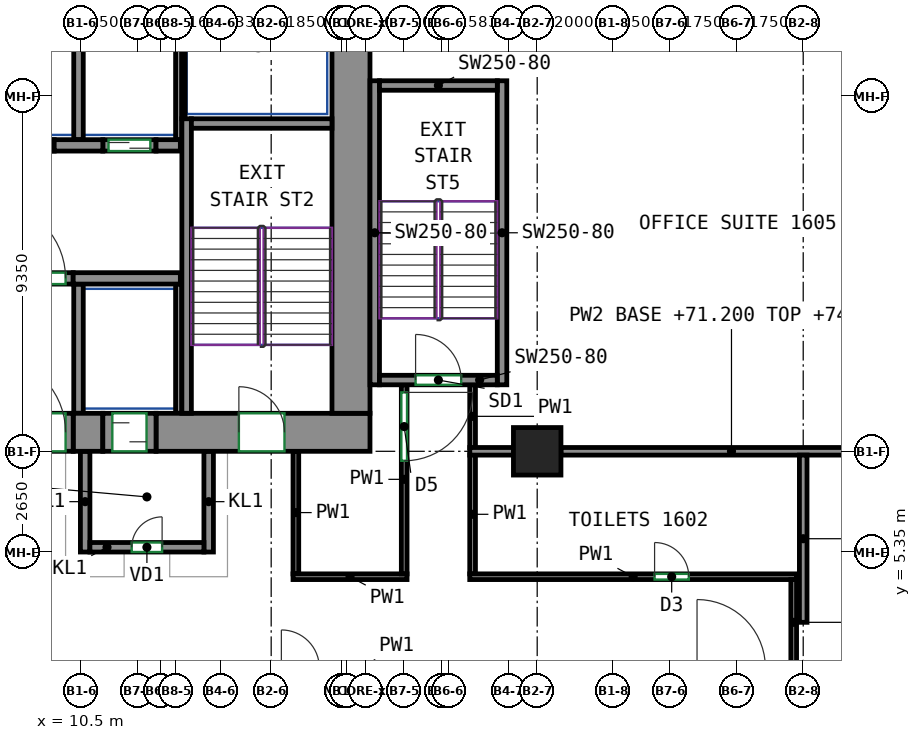
"""IFC4 building model, lengths in metres.
Left out: names, types, materials, properties, quantities, classifications, styles, units other than length and angle.
Written with IfcOpenShell. Run it as: python <this file> out.ifc"""

import sys

from ifc_helpers import new_model, si_unit, direction, frame, frame_2d, origin, origin_2d, place, context, subcontext, project, spatial, rectangle, extrude, source, transform, mapped, element, fill, save


model = new_model("IFC4")
c1 = context("Model", 3, precision=1e-05, world=origin(), true_north=direction((0.0, 1.0)))
c2 = subcontext(c1, "Body", "Model", "MODEL_VIEW")
j1 = project(units=[si_unit("LENGTHUNIT", "METRE"), si_unit("PLANEANGLEUNIT", "RADIAN")], contexts=[c1])
p1 = place(None, origin())
s1 = spatial("IfcSite", under=j1, at=p1, CompositionType="ELEMENT")
p2 = place(p1, origin())
s2 = spatial("IfcBuilding", under=s1, at=p2, CompositionType="ELEMENT")
p3 = place(p2, frame((0.0, 0.0, 71.2)))
s3 = spatial("IfcBuildingStorey", under=s2, at=p3, CompositionType="ELEMENT", Elevation=71.2)
m1 = source(origin(), c2, "Body", "SweptSolid", [
    extrude(rectangle(XDim=1.25, YDim=1.25, at=origin_2d()), origin(), (0.0, 0.0, 1.0), 3.72),
])
p4 = place(p3, frame((22.5, 8.0, 0.0), z_axis=(0.0, 0.0, 1.0), x_axis=(1.0, 0.0, 0.0)))
e1 = element("IfcColumn", 1, at=p4, inside=s3, PredefinedType="COLUMN", context=c2, shape_type="MappedRepresentation", body=[
    mapped(m1, transform((0.0, 0.0, 0.0))),
])
m2 = source(origin(), c2, "Body", "SweptSolid", [
    extrude(rectangle(XDim=0.78, YDim=1.0, at=frame_2d((0.39, 0.0))), origin(), (0.0, 0.0, 1.0), 3.72),
])
p5 = place(p3, frame((10.29, 8.5, 0.0), z_axis=(0.0, 0.0, 1.0), x_axis=(1.0, 0.0, 0.0)))
e2 = element("IfcWall", 2, at=p5, inside=s3, PredefinedType="SHEAR", context=c2, shape_type="MappedRepresentation", body=[
    mapped(m2, transform((0.0, 0.0, 0.0))),
])
m3 = source(origin(), c2, "Body", "SweptSolid", [
    extrude(rectangle(XDim=5.63, YDim=1.0, at=frame_2d((2.815, 0.0))), origin(), (0.0, 0.0, 1.0), 3.72),
])
p6 = place(p3, frame((12.47, 8.5, 0.0), z_axis=(0.0, 0.0, 1.0), x_axis=(1.0, 0.0, 0.0)))
e3 = element("IfcWall", 3, at=p6, inside=s3, PredefinedType="SHEAR", context=c2, shape_type="MappedRepresentation", body=[
    mapped(m3, transform((0.0, 0.0, 0.0))),
])
p7 = place(p6, frame((2.18, 0.0, 0.0)))
e4 = element("IfcOpeningElement", 4, at=p7, cuts=e3, PredefinedType="OPENING", context=c2, shape_type="SweptSolid", body=[
    extrude(rectangle(XDim=1.2, YDim=2.1, at=frame_2d((0.6, 1.05))), frame((0.0, 0.51, 0.0), z_axis=(0.0, -1.0, 0.0), x_axis=(1.0, 0.0, 0.0)), (0.0, 0.0, 1.0), 1.02),
])
m4 = source(origin(), c2, "Body", "SweptSolid", [
    extrude(rectangle(XDim=12.0, YDim=1.0, at=frame_2d((6.0, 0.0))), origin(), (0.0, 0.0, 1.0), 3.72),
])
p8 = place(p3, frame((17.6, 9.0, 0.0), z_axis=(0.0, 0.0, 1.0), x_axis=(0.0, 1.0, 0.0)))
e5 = element("IfcWall", 5, at=p8, inside=s3, PredefinedType="SHEAR", context=c2, shape_type="MappedRepresentation", body=[
    mapped(m4, transform((0.0, 0.0, 0.0))),
])
m5 = source(origin(), c2, "Body", "SweptSolid", [
    extrude(rectangle(XDim=7.75, YDim=0.25, at=frame_2d((3.875, 0.0))), origin(), (0.0, 0.0, 1.0), 3.72),
])
p9 = place(p3, frame((13.275, 9.0, 0.0), z_axis=(0.0, 0.0, 1.0), x_axis=(0.0, 1.0, 0.0)))
e6 = element("IfcWall", 6, at=p9, inside=s3, PredefinedType="SHEAR", context=c2, shape_type="MappedRepresentation", body=[
    mapped(m5, transform((0.0, 0.0, 0.0))),
])
m6 = source(origin(), c2, "Body", "SweptSolid", [
    extrude(rectangle(XDim=3.7, YDim=0.25, at=frame_2d((1.85, 0.0))), origin(), (0.0, 0.0, 1.0), 3.72),
])
p10 = place(p3, frame((13.4, 16.625, 0.0), z_axis=(0.0, 0.0, 1.0), x_axis=(1.0, 0.0, 0.0)))
e7 = element("IfcWall", 7, at=p10, inside=s3, PredefinedType="SHEAR", context=c2, shape_type="MappedRepresentation", body=[
    mapped(m6, transform((0.0, 0.0, 0.0))),
])
m7 = source(origin(), c2, "Body", "SweptSolid", [
    extrude(rectangle(XDim=8.0, YDim=0.25, at=frame_2d((4.0, 0.0))), origin(), (0.0, 0.0, 1.0), 3.72),
])
for number, where, z_axis, x_axis in (
    (8, (18.225, 9.75, 0.0), (0.0, 0.0, 1.0), (0.0, 1.0, 0.0)),
    (9, (21.575, 9.75, 0.0), (0.0, 0.0, 1.0), (0.0, 1.0, 0.0)),
):
    element("IfcWall", number, at=place(p3, frame(where, z_axis=z_axis, x_axis=x_axis)), inside=s3, PredefinedType="SHEAR", context=c2, shape_type="MappedRepresentation", body=[
        mapped(m7, transform((0.0, 0.0, 0.0))),
    ])
m8 = source(origin(), c2, "Body", "SweptSolid", [
    extrude(rectangle(XDim=3.1, YDim=0.25, at=frame_2d((1.55, 0.0))), origin(), (0.0, 0.0, 1.0), 3.72),
])
p11 = place(p3, frame((18.35, 9.875, 0.0), z_axis=(0.0, 0.0, 1.0), x_axis=(1.0, 0.0, 0.0)))
e10 = element("IfcWall", 10, at=p11, inside=s3, PredefinedType="SHEAR", context=c2, shape_type="MappedRepresentation", body=[
    mapped(m8, transform((0.0, 0.0, 0.0))),
])
p12 = place(p11, frame((0.95, 0.0, 0.0)))
e11 = element("IfcOpeningElement", 11, at=p12, cuts=e10, PredefinedType="OPENING", context=c2, shape_type="SweptSolid", body=[
    extrude(rectangle(XDim=1.2, YDim=2.1, at=frame_2d((0.6, 1.05))), frame((0.0, 0.135, 0.0), z_axis=(0.0, -1.0, 0.0), x_axis=(1.0, 0.0, 0.0)), (0.0, 0.0, 1.0), 0.27),
])
p13 = place(p3, frame((18.35, 17.625, 0.0), z_axis=(0.0, 0.0, 1.0), x_axis=(1.0, 0.0, 0.0)))
e12 = element("IfcWall", 12, at=p13, inside=s3, PredefinedType="SHEAR", context=c2, shape_type="MappedRepresentation", body=[
    mapped(m8, transform((0.0, 0.0, 0.0))),
])
m9 = source(origin(), c2, "Body", "SweptSolid", [
    extrude(rectangle(XDim=2.82, YDim=0.3, at=frame_2d((1.41, 0.0))), origin(), (0.0, 0.0, 1.0), 3.72),
])
p14 = place(p3, frame((10.29, 12.55, 0.0), z_axis=(0.0, 0.0, 1.0), x_axis=(1.0, 0.0, 0.0)))
e13 = element("IfcWall", 13, at=p14, inside=s3, PredefinedType="SHEAR", context=c2, shape_type="MappedRepresentation", body=[
    mapped(m9, transform((0.0, 0.0, 0.0))),
])
m10 = source(origin(), c2, "Body", "SweptSolid", [
    extrude(rectangle(XDim=1.28, YDim=0.3, at=frame_2d((0.64, 0.0))), origin(), (0.0, 0.0, 1.0), 3.72),
])
p15 = place(p3, frame((9.79, 16.05, 0.0), z_axis=(0.0, 0.0, 1.0), x_axis=(1.0, 0.0, 0.0)))
e14 = element("IfcWall", 14, at=p15, inside=s3, PredefinedType="SHEAR", context=c2, shape_type="MappedRepresentation", body=[
    mapped(m10, transform((0.0, 0.0, 0.0))),
])
m11 = source(origin(), c2, "Body", "SweptSolid", [
    extrude(rectangle(XDim=0.64, YDim=0.3, at=frame_2d((0.32, 0.0))), origin(), (0.0, 0.0, 1.0), 3.72),
])
p16 = place(p3, frame((12.47, 16.05, 0.0), z_axis=(0.0, 0.0, 1.0), x_axis=(1.0, 0.0, 0.0)))
e15 = element("IfcWall", 15, at=p16, inside=s3, PredefinedType="SHEAR", context=c2, shape_type="MappedRepresentation", body=[
    mapped(m11, transform((0.0, 0.0, 0.0))),
])
m12 = source(origin(), c2, "Body", "SweptSolid", [
    extrude(rectangle(XDim=1.4, YDim=0.3, at=frame_2d((0.7, 0.0))), origin(), (0.0, 0.0, 1.0), 3.72),
])
p17 = place(p3, frame((11.07, 16.05, 0.0), z_axis=(0.0, 0.0, 1.0), x_axis=(1.0, 0.0, 0.0)))
e16 = element("IfcWall", 16, at=p17, inside=s3, PredefinedType="PARTITIONING", context=c2, shape_type="MappedRepresentation", body=[
    mapped(m12, transform((0.0, 0.0, 0.0))),
])
p18 = place(p17, frame((0.15, 0.0, 0.0)))
e17 = element("IfcOpeningElement", 17, at=p18, cuts=e16, PredefinedType="OPENING", context=c2, shape_type="SweptSolid", body=[
    extrude(rectangle(XDim=1.1, YDim=2.1, at=frame_2d((0.55, 1.05))), frame((0.0, 0.16, 0.0), z_axis=(0.0, -1.0, 0.0), x_axis=(1.0, 0.0, 0.0)), (0.0, 0.0, 1.0), 0.32),
])
m13 = source(origin(), c2, "Body", "SweptSolid", [
    extrude(rectangle(XDim=2.4, YDim=0.3, at=frame_2d((1.2, 0.0))), origin(), (0.0, 0.0, 1.0), 3.72),
])
p19 = place(p3, frame((7.89, 12.55, 0.0), z_axis=(0.0, 0.0, 1.0), x_axis=(1.0, 0.0, 0.0)))
e18 = element("IfcWall", 18, at=p19, inside=s3, PredefinedType="PARTITIONING", context=c2, shape_type="MappedRepresentation", body=[
    mapped(m13, transform((0.0, 0.0, 0.0))),
])
p20 = place(p19, frame((0.2, 0.0, 0.0)))
e19 = element("IfcOpeningElement", 19, at=p20, cuts=e18, PredefinedType="OPENING", context=c2, shape_type="SweptSolid", body=[
    extrude(rectangle(XDim=2.0, YDim=2.1, at=frame_2d((1.0, 1.05))), frame((0.0, 0.16, 0.0), z_axis=(0.0, -1.0, 0.0), x_axis=(1.0, 0.0, 0.0)), (0.0, 0.0, 1.0), 0.32),
])
m14 = source(origin(), c2, "Body", "SweptSolid", [
    extrude(rectangle(XDim=1.4, YDim=0.3, at=frame_2d((0.7, 0.0))), origin(), (0.0, 0.0, 1.0), 3.72),
])
p21 = place(p3, frame((8.39, 16.05, 0.0), z_axis=(0.0, 0.0, 1.0), x_axis=(1.0, 0.0, 0.0)))
e20 = element("IfcWall", 20, at=p21, inside=s3, PredefinedType="PARTITIONING", context=c2, shape_type="MappedRepresentation", body=[
    mapped(m14, transform((0.0, 0.0, 0.0))),
])
m15 = source(origin(), c2, "Body", "SweptSolid", [
    extrude(rectangle(XDim=2.65, YDim=0.25, at=frame_2d((1.325, 0.0))), origin(), (0.0, 0.0, 1.0), 3.72),
])
for number, where, z_axis, x_axis in (
    (21, (10.605, 5.35, 0.0), (0.0, 0.0, 1.0), (0.0, 1.0, 0.0)),
    (22, (13.855, 5.35, 0.0), (0.0, 0.0, 1.0), (0.0, 1.0, 0.0)),
):
    element("IfcWall", number, at=place(p3, frame(where, z_axis=z_axis, x_axis=x_axis)), inside=s3, PredefinedType="PARTITIONING", context=c2, shape_type="MappedRepresentation", body=[
        mapped(m15, transform((0.0, 0.0, 0.0))),
    ])
m16 = source(origin(), c2, "Body", "SweptSolid", [
    extrude(rectangle(XDim=3.0, YDim=0.25, at=frame_2d((1.5, 0.0))), origin(), (0.0, 0.0, 1.0), 3.72),
])
p22 = place(p3, frame((10.73, 5.475, 0.0), z_axis=(0.0, 0.0, 1.0), x_axis=(1.0, 0.0, 0.0)))
e23 = element("IfcWall", 23, at=p22, inside=s3, PredefinedType="PARTITIONING", context=c2, shape_type="MappedRepresentation", body=[
    mapped(m16, transform((0.0, 0.0, 0.0))),
])
p23 = place(p22, frame((1.1, 0.0, 0.0)))
e24 = element("IfcOpeningElement", 24, at=p23, cuts=e23, PredefinedType="OPENING", context=c2, shape_type="SweptSolid", body=[
    extrude(rectangle(XDim=0.8, YDim=2.0, at=frame_2d((0.4, 1.0))), frame((0.0, 0.135, 0.0), z_axis=(0.0, -1.0, 0.0), x_axis=(1.0, 0.0, 0.0)), (0.0, 0.0, 1.0), 0.27),
])
m17 = source(origin(), c2, "Body", "SweptSolid", [
    extrude(rectangle(XDim=3.275, YDim=0.165, at=frame_2d((1.638, 0.0))), origin(), (0.0, 0.0, 1.0), 3.72),
])
p24 = place(p3, frame((13.067, 16.2, 0.0), z_axis=(0.0, 0.0, 1.0), x_axis=(0.0, 1.0, 0.0)))
e25 = element("IfcWall", 25, at=p24, inside=s3, PredefinedType="PARTITIONING", context=c2, shape_type="MappedRepresentation", body=[
    mapped(m17, transform((0.0, 0.0, 0.0))),
])
m18 = source(origin(), c2, "Body", "SweptSolid", [
    extrude(rectangle(XDim=3.275, YDim=0.25, at=frame_2d((1.638, 0.0))), origin(), (0.0, 0.0, 1.0), 3.72),
])
p25 = place(p3, frame((10.43, 16.2, 0.0), z_axis=(0.0, 0.0, 1.0), x_axis=(0.0, 1.0, 0.0)))
e26 = element("IfcWall", 26, at=p25, inside=s3, PredefinedType="PARTITIONING", context=c2, shape_type="MappedRepresentation", body=[
    mapped(m18, transform((0.0, 0.0, 0.0))),
])
m19 = source(origin(), c2, "Body", "SweptSolid", [
    extrude(rectangle(XDim=2.725, YDim=0.085, at=frame_2d((1.363, 0.0))), origin(), (0.0, 0.0, 1.0), 3.72),
])
p26 = place(p3, frame((13.192, 16.75, 0.0), z_axis=(0.0, 0.0, 1.0), x_axis=(0.0, 1.0, 0.0)))
e27 = element("IfcWall", 27, at=p26, inside=s3, PredefinedType="PARTITIONING", context=c2, shape_type="MappedRepresentation", body=[
    mapped(m19, transform((0.0, 0.0, 0.0))),
])
m20 = source(origin(), c2, "Body", "SweptSolid", [
    extrude(rectangle(XDim=3.4, YDim=0.25, at=frame_2d((1.7, 0.0))), origin(), (0.0, 0.0, 1.0), 3.72),
])
p27 = place(p3, frame((10.43, 9.0, 0.0), z_axis=(0.0, 0.0, 1.0), x_axis=(0.0, 1.0, 0.0)))
e28 = element("IfcWall", 28, at=p27, inside=s3, PredefinedType="PARTITIONING", context=c2, shape_type="MappedRepresentation", body=[
    mapped(m20, transform((0.0, 0.0, 0.0))),
])
m21 = source(origin(), c2, "Body", "SweptSolid", [
    extrude(rectangle(XDim=3.4, YDim=0.165, at=frame_2d((1.7, 0.0))), origin(), (0.0, 0.0, 1.0), 3.72),
])
p28 = place(p3, frame((13.067, 9.0, 0.0), z_axis=(0.0, 0.0, 1.0), x_axis=(0.0, 1.0, 0.0)))
e29 = element("IfcWall", 29, at=p28, inside=s3, PredefinedType="PARTITIONING", context=c2, shape_type="MappedRepresentation", body=[
    mapped(m21, transform((0.0, 0.0, 0.0))),
])
m22 = source(origin(), c2, "Body", "SweptSolid", [
    extrude(rectangle(XDim=2.4, YDim=1.0, at=frame_2d((1.2, 0.0))), origin(), (0.0, 0.0, 1.0), 2.7),
])
p29 = place(p3, frame((7.89, 8.5, 0.0), z_axis=(0.0, 0.0, 1.0), x_axis=(1.0, 0.0, 0.0)))
e30 = element("IfcWall", 30, at=p29, inside=s3, PredefinedType="PARTITIONING", context=c2, shape_type="MappedRepresentation", body=[
    mapped(m22, transform((0.0, 0.0, 0.0))),
])
p30 = place(p29, frame((0.2, 0.0, 0.0)))
e31 = element("IfcOpeningElement", 31, at=p30, cuts=e30, PredefinedType="OPENING", context=c2, shape_type="SweptSolid", body=[
    extrude(rectangle(XDim=2.0, YDim=2.1, at=frame_2d((1.0, 1.05))), frame((0.0, 0.51, 0.0), z_axis=(0.0, -1.0, 0.0), x_axis=(1.0, 0.0, 0.0)), (0.0, 0.0, 1.0), 1.02),
])
m23 = source(origin(), c2, "Body", "SweptSolid", [
    extrude(rectangle(XDim=1.4, YDim=1.0, at=frame_2d((0.7, 0.0))), origin(), (0.0, 0.0, 1.0), 2.7),
])
p31 = place(p3, frame((11.07, 8.5, 0.0), z_axis=(0.0, 0.0, 1.0), x_axis=(1.0, 0.0, 0.0)))
e32 = element("IfcWall", 32, at=p31, inside=s3, PredefinedType="PARTITIONING", context=c2, shape_type="MappedRepresentation", body=[
    mapped(m23, transform((0.0, 0.0, 0.0))),
])
p32 = place(p31, frame((0.25, 0.0, 0.0)))
e33 = element("IfcOpeningElement", 33, at=p32, cuts=e32, PredefinedType="OPENING", context=c2, shape_type="SweptSolid", body=[
    extrude(rectangle(XDim=0.9, YDim=2.1, at=frame_2d((0.45, 1.05))), frame((0.0, 0.51, 0.0), z_axis=(0.0, -1.0, 0.0), x_axis=(1.0, 0.0, 0.0)), (0.0, 0.0, 1.0), 1.02),
])
p33 = place(p3, frame((16.15, 4.775, 0.0), z_axis=(0.0, 0.0, 1.0), x_axis=(0.0, 1.0, 0.0)))
e34 = element("IfcWall", 34, at=p33, inside=s3, PredefinedType="PARTITIONING", context=c2, shape_type="SweptSolid", body=[
    extrude(rectangle(XDim=3.225, YDim=0.15, at=frame_2d((1.613, 0.0))), origin(), (0.0, 0.0, 1.0), 3.72),
])
p34 = place(p3, frame((16.075, 4.7, 0.0), z_axis=(0.0, 0.0, 1.0), x_axis=(1.0, 0.0, 0.0)))
e35 = element("IfcWall", 35, at=p34, inside=s3, PredefinedType="PARTITIONING", context=c2, shape_type="SweptSolid", body=[
    extrude(rectangle(XDim=3.0, YDim=0.15, at=frame_2d((1.5, 0.0))), origin(), (0.0, 0.0, 1.0), 3.72),
])
p35 = place(p3, frame((19.0, 9.75, 0.0), z_axis=(0.0, 0.0, 1.0), x_axis=(0.0, -1.0, 0.0)))
e36 = element("IfcWall", 36, at=p35, inside=s3, PredefinedType="PARTITIONING", context=c2, shape_type="SweptSolid", body=[
    extrude(rectangle(XDim=4.975, YDim=0.15, at=frame_2d((2.488, 0.0))), origin(), (0.0, 0.0, 1.0), 3.72),
])
p36 = place(p35, frame((0.2, 0.0, 0.0)))
e37 = element("IfcOpeningElement", 37, at=p36, cuts=e36, PredefinedType="OPENING", context=c2, shape_type="SweptSolid", body=[
    extrude(rectangle(XDim=1.8, YDim=2.1, at=frame_2d((0.9, 1.05))), frame((0.0, 0.085, 0.0), z_axis=(0.0, -1.0, 0.0), x_axis=(1.0, 0.0, 0.0)), (0.0, 0.0, 1.0), 0.17),
])
p37 = place(p3, frame((20.8, 8.09, 0.0), z_axis=(0.0, 0.0, 1.0), x_axis=(0.0, 1.0, 0.0)))
e38 = element("IfcWall", 38, at=p37, inside=s3, PredefinedType="PARTITIONING", context=c2, shape_type="SweptSolid", body=[
    extrude(rectangle(XDim=1.66, YDim=0.15, at=frame_2d((0.83, 0.0))), origin(), (0.0, 0.0, 1.0), 3.72),
])
p38 = place(p3, frame((20.8, 4.775, 0.0), z_axis=(0.0, 0.0, 1.0), x_axis=(0.0, 1.0, 0.0)))
e39 = element("IfcWall", 39, at=p38, inside=s3, PredefinedType="PARTITIONING", context=c2, shape_type="SweptSolid", body=[
    extrude(rectangle(XDim=3.135, YDim=0.15, at=frame_2d((1.567, 0.0))), origin(), (0.0, 0.0, 1.0), 3.72),
])
p39 = place(p3, frame((20.725, 4.7, 0.0), z_axis=(0.0, 0.0, 1.0), x_axis=(1.0, 0.0, 0.0)))
e40 = element("IfcWall", 40, at=p39, inside=s3, PredefinedType="PARTITIONING", context=c2, shape_type="SweptSolid", body=[
    extrude(rectangle(XDim=8.6, YDim=0.15, at=frame_2d((4.3, 0.0))), origin(), (0.0, 0.0, 1.0), 3.72),
])
p40 = place(p39, frame((4.864, 0.0, 0.0)))
e41 = element("IfcOpeningElement", 41, at=p40, cuts=e40, PredefinedType="OPENING", context=c2, shape_type="SweptSolid", body=[
    extrude(rectangle(XDim=0.9, YDim=2.1, at=frame_2d((0.45, 1.05))), frame((0.0, 0.085, 0.0), z_axis=(0.0, -1.0, 0.0), x_axis=(1.0, 0.0, 0.0)), (0.0, 0.0, 1.0), 0.17),
])
p41 = place(p3, frame((29.25, 2.375, 0.0), z_axis=(0.0, 0.0, 1.0), x_axis=(0.0, 1.0, 0.0)))
e42 = element("IfcWall", 42, at=p41, inside=s3, PredefinedType="PARTITIONING", context=c2, shape_type="SweptSolid", body=[
    extrude(rectangle(XDim=2.25, YDim=0.15, at=frame_2d((1.125, 0.0))), origin(), (0.0, 0.0, 1.0), 3.07),
])
p42 = place(p3, frame((23.125, 8.0, 0.0), z_axis=(0.0, 0.0, 1.0), x_axis=(1.0, 0.0, 0.0)))
e43 = element("IfcWall", 43, at=p42, inside=s3, PredefinedType="PARTITIONING", context=c2, shape_type="SweptSolid", body=[
    extrude(rectangle(XDim=8.975, YDim=0.2, at=frame_2d((4.488, 0.0))), origin(), (0.0, 0.0, 1.0), 3.07),
])
p43 = place(p3, frame((20.726, 8.0, 0.0), z_axis=(0.0, 0.0, 1.0), x_axis=(1.0, 0.0, 0.0)))
e44 = element("IfcWall", 44, at=p43, inside=s3, PredefinedType="PARTITIONING", context=c2, shape_type="SweptSolid", body=[
    extrude(rectangle(XDim=1.149, YDim=0.2, at=frame_2d((0.574, 0.0))), origin(), (0.0, 0.0, 1.0), 3.72),
])
p44 = place(p3, frame((29.5, 3.5, 0.0), z_axis=(0.0, 0.0, 1.0), x_axis=(0.0, 1.0, 0.0)))
e45 = element("IfcWall", 45, at=p44, inside=s3, PredefinedType="PARTITIONING", context=c2, shape_type="SweptSolid", body=[
    extrude(rectangle(XDim=4.4, YDim=0.2, at=frame_2d((2.2, 0.0))), origin(), (0.0, 0.0, 1.0), 3.07),
])
p45 = place(p20, origin())
e46 = element("IfcDoor", 46, at=p45, inside=s3, OperationType="DOUBLE_DOOR_SINGLE_SWING", PredefinedType="DOOR", context=c2, shape_type="SweptSolid", body=[
    extrude(rectangle(XDim=2.0, YDim=2.1, at=frame_2d((1.0, 1.05))), frame((0.0, 0.025, 0.0), z_axis=(0.0, -1.0, 0.0), x_axis=(1.0, 0.0, 0.0)), (0.0, 0.0, 1.0), 0.05),
])
fill(e19, e46)
p46 = place(p30, origin())
e47 = element("IfcDoor", 47, at=p46, inside=s3, OperationType="DOUBLE_DOOR_SINGLE_SWING", PredefinedType="DOOR", context=c2, shape_type="SweptSolid", body=[
    extrude(rectangle(XDim=2.0, YDim=2.1, at=frame_2d((1.0, 1.05))), frame((0.0, 0.405, 0.0), z_axis=(0.0, -1.0, 0.0), x_axis=(1.0, 0.0, 0.0)), (0.0, 0.0, 1.0), 0.05),
])
fill(e31, e47)
p47 = place(p23, origin())
e48 = element("IfcDoor", 48, at=p47, inside=s3, OperationType="SINGLE_SWING_RIGHT", PredefinedType="DOOR", context=c2, shape_type="SweptSolid", body=[
    extrude(rectangle(XDim=0.8, YDim=2.0, at=frame_2d((0.4, 1.0))), frame((0.0, 0.025, 0.0), z_axis=(0.0, -1.0, 0.0), x_axis=(1.0, 0.0, 0.0)), (0.0, 0.0, 1.0), 0.05),
])
fill(e24, e48)
p48 = place(p32, origin())
e49 = element("IfcDoor", 49, at=p48, inside=s3, OperationType="SLIDING_TO_LEFT", PredefinedType="DOOR", context=c2, shape_type="SweptSolid", body=[
    extrude(rectangle(XDim=0.9, YDim=2.1, at=frame_2d((0.45, 1.05))), frame((0.0, 0.405, 0.0), z_axis=(0.0, -1.0, 0.0), x_axis=(1.0, 0.0, 0.0)), (0.0, 0.0, 1.0), 0.05),
])
fill(e33, e49)
p49 = place(p18, origin())
e50 = element("IfcDoor", 50, at=p49, inside=s3, OperationType="DOUBLE_DOOR_SLIDING", PredefinedType="DOOR", context=c2, shape_type="SweptSolid", body=[
    extrude(rectangle(XDim=1.1, YDim=2.1, at=frame_2d((0.55, 1.05))), frame((0.0, 0.025, 0.0), z_axis=(0.0, -1.0, 0.0), x_axis=(1.0, 0.0, 0.0)), (0.0, 0.0, 1.0), 0.05),
])
fill(e17, e50)
p50 = place(p7, origin())
e51 = element("IfcDoor", 51, at=p50, inside=s3, OperationType="DOUBLE_DOOR_SINGLE_SWING", PredefinedType="DOOR", context=c2, shape_type="SweptSolid", body=[
    extrude(rectangle(XDim=1.2, YDim=2.1, at=frame_2d((0.6, 1.05))), frame((0.0, 0.405, 0.0), z_axis=(0.0, -1.0, 0.0), x_axis=(1.0, 0.0, 0.0)), (0.0, 0.0, 1.0), 0.05),
])
fill(e4, e51)
p51 = place(p12, origin())
e52 = element("IfcDoor", 52, at=p51, inside=s3, OperationType="DOUBLE_DOOR_SINGLE_SWING", PredefinedType="DOOR", context=c2, shape_type="SweptSolid", body=[
    extrude(rectangle(XDim=1.2, YDim=2.1, at=frame_2d((0.6, 1.05))), frame((0.0, 0.025, 0.0), z_axis=(0.0, -1.0, 0.0), x_axis=(1.0, 0.0, 0.0)), (0.0, 0.0, 1.0), 0.05),
])
fill(e11, e52)
p52 = place(p40, origin())
e53 = element("IfcDoor", 53, at=p52, inside=s3, OperationType="SINGLE_SWING_LEFT", PredefinedType="DOOR", context=c2, shape_type="SweptSolid", body=[
    extrude(rectangle(XDim=0.9, YDim=2.1, at=frame_2d((0.45, 1.05))), frame((0.0, 0.025, 0.0), z_axis=(0.0, -1.0, 0.0), x_axis=(1.0, 0.0, 0.0)), (0.0, 0.0, 1.0), 0.05),
])
fill(e41, e53)
p53 = place(p36, origin())
e54 = element("IfcDoor", 54, at=p53, inside=s3, OperationType="DOUBLE_DOOR_SINGLE_SWING", PredefinedType="DOOR", context=c2, shape_type="SweptSolid", body=[
    extrude(rectangle(XDim=1.8, YDim=2.1, at=frame_2d((0.9, 1.05))), frame((0.0, 0.025, 0.0), z_axis=(0.0, -1.0, 0.0), x_axis=(1.0, 0.0, 0.0)), (0.0, 0.0, 1.0), 0.05),
])
fill(e37, e54)
save(model, sys.argv[1])
